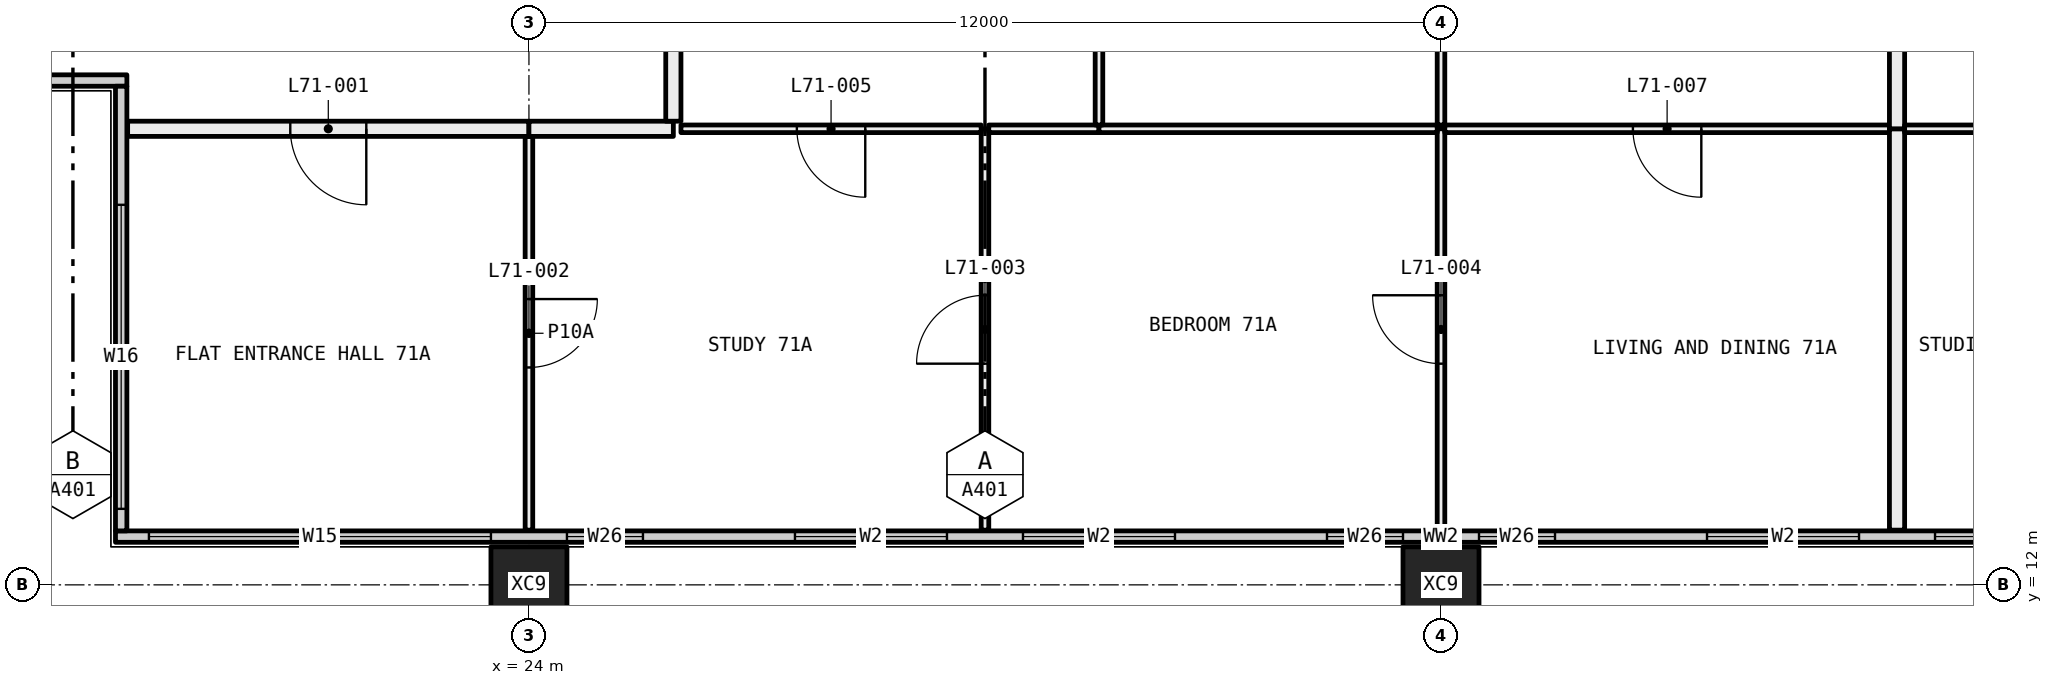
"""IFC4 building model, lengths in metres.
Left out: names, types, materials, properties, quantities, classifications, styles, units other than length and angle.
Written with IfcOpenShell. Run it as: python <this file> out.ifc"""

import sys

from ifc_helpers import new_model, si_unit, direction, frame, frame_2d, origin, origin_2d, place, context, subcontext, project, spatial, rectangle, hollow_rectangle, extrude, element, fill, save


model = new_model("IFC4")
c1 = context("Model", 3, precision=1e-05, world=origin(), true_north=direction((0.0, 1.0)))
c2 = subcontext(c1, "Body", "Model", "MODEL_VIEW")
j1 = project(units=[si_unit("LENGTHUNIT", "METRE"), si_unit("PLANEANGLEUNIT", "RADIAN")], contexts=[c1])
p1 = place(None, origin())
s1 = spatial("IfcSite", under=j1, at=p1, CompositionType="ELEMENT")
p2 = place(p1, origin())
s2 = spatial("IfcBuilding", under=s1, at=p2, CompositionType="ELEMENT")
p3 = place(p2, frame((0.0, 0.0, 262.8)))
s3 = spatial("IfcBuildingStorey", under=s2, at=p3, CompositionType="ELEMENT", Elevation=262.8)
for number, where, z_axis, x_axis in (
    (1, (24.0, 12.0, -0.4), (0.0, 0.0, 1.0), (1.0, 0.0, 0.0)),
    (2, (36.0, 12.0, -0.4), (0.0, 0.0, 1.0), (1.0, 0.0, 0.0)),
):
    element("IfcColumn", number, at=place(p3, frame(where, z_axis=z_axis, x_axis=x_axis)), inside=s3, PredefinedType="COLUMN", context=c2, shape_type="SweptSolid", body=[
        extrude(hollow_rectangle(XDim=1.0, YDim=1.0, WallThickness=0.036, at=origin_2d()), origin(), (0.0, 0.0, 1.0), 3.45),
    ])
p4 = place(p3, frame((18.56, 12.635, 0.0), z_axis=(0.0, 0.0, 1.0), x_axis=(1.0, 0.0, 0.0)))
e3 = element("IfcWall", 3, at=p4, inside=s3, PredefinedType="ELEMENTEDWALL", context=c2, shape_type="SweptSolid", body=[
    extrude(rectangle(XDim=34.88, YDim=0.15, at=frame_2d((17.44, 0.0))), origin(), (0.0, 0.0, 1.0), 3.05),
])
p5 = place(p4, frame((0.44, 0.0, 0.45)))
e4 = element("IfcOpeningElement", 4, at=p5, cuts=e3, PredefinedType="OPENING", context=c2, shape_type="SweptSolid", body=[
    extrude(rectangle(XDim=4.5, YDim=2.55, at=frame_2d((2.25, 1.275))), frame((0.0, 0.085, 0.0), z_axis=(0.0, -1.0, 0.0), x_axis=(1.0, 0.0, 0.0)), (0.0, 0.0, 1.0), 0.17),
])
p6 = place(p4, frame((5.94, 0.0, 0.45)))
e5 = element("IfcOpeningElement", 5, at=p6, cuts=e3, PredefinedType="OPENING", context=c2, shape_type="SweptSolid", body=[
    extrude(rectangle(XDim=1.0, YDim=2.55, at=frame_2d((0.5, 1.275))), frame((0.0, 0.085, 0.0), z_axis=(0.0, -1.0, 0.0), x_axis=(1.0, 0.0, 0.0)), (0.0, 0.0, 1.0), 0.17),
])
p7 = place(p4, frame((8.94, 0.0, 0.45)))
e6 = element("IfcOpeningElement", 6, at=p7, cuts=e3, PredefinedType="OPENING", context=c2, shape_type="SweptSolid", body=[
    extrude(rectangle(XDim=2.0, YDim=2.55, at=frame_2d((1.0, 1.275))), frame((0.0, 0.085, 0.0), z_axis=(0.0, -1.0, 0.0), x_axis=(1.0, 0.0, 0.0)), (0.0, 0.0, 1.0), 0.17),
])
p8 = place(p4, frame((11.94, 0.0, 0.45)))
e7 = element("IfcOpeningElement", 7, at=p8, cuts=e3, PredefinedType="OPENING", context=c2, shape_type="SweptSolid", body=[
    extrude(rectangle(XDim=2.0, YDim=2.55, at=frame_2d((1.0, 1.275))), frame((0.0, 0.085, 0.0), z_axis=(0.0, -1.0, 0.0), x_axis=(1.0, 0.0, 0.0)), (0.0, 0.0, 1.0), 0.17),
])
p9 = place(p4, frame((15.94, 0.0, 0.45)))
e8 = element("IfcOpeningElement", 8, at=p9, cuts=e3, PredefinedType="OPENING", context=c2, shape_type="SweptSolid", body=[
    extrude(rectangle(XDim=1.0, YDim=2.55, at=frame_2d((0.5, 1.275))), frame((0.0, 0.085, 0.0), z_axis=(0.0, -1.0, 0.0), x_axis=(1.0, 0.0, 0.0)), (0.0, 0.0, 1.0), 0.17),
])
p10 = place(p4, frame((17.94, 0.0, 0.45)))
e9 = element("IfcOpeningElement", 9, at=p10, cuts=e3, PredefinedType="OPENING", context=c2, shape_type="SweptSolid", body=[
    extrude(rectangle(XDim=1.0, YDim=2.55, at=frame_2d((0.5, 1.275))), frame((0.0, 0.085, 0.0), z_axis=(0.0, -1.0, 0.0), x_axis=(1.0, 0.0, 0.0)), (0.0, 0.0, 1.0), 0.17),
])
p11 = place(p4, frame((20.94, 0.0, 0.45)))
e10 = element("IfcOpeningElement", 10, at=p11, cuts=e3, PredefinedType="OPENING", context=c2, shape_type="SweptSolid", body=[
    extrude(rectangle(XDim=2.0, YDim=2.55, at=frame_2d((1.0, 1.275))), frame((0.0, 0.085, 0.0), z_axis=(0.0, -1.0, 0.0), x_axis=(1.0, 0.0, 0.0)), (0.0, 0.0, 1.0), 0.17),
])
p12 = place(p4, frame((23.94, 0.0, 0.45)))
e11 = element("IfcOpeningElement", 11, at=p12, cuts=e3, PredefinedType="OPENING", context=c2, shape_type="SweptSolid", body=[
    extrude(rectangle(XDim=2.0, YDim=2.55, at=frame_2d((1.0, 1.275))), frame((0.0, 0.085, 0.0), z_axis=(0.0, -1.0, 0.0), x_axis=(1.0, 0.0, 0.0)), (0.0, 0.0, 1.0), 0.17),
])
p13 = place(p4, frame((27.94, 0.0, 0.45)))
e12 = element("IfcOpeningElement", 12, at=p13, cuts=e3, PredefinedType="OPENING", context=c2, shape_type="SweptSolid", body=[
    extrude(rectangle(XDim=1.0, YDim=2.55, at=frame_2d((0.5, 1.275))), frame((0.0, 0.085, 0.0), z_axis=(0.0, -1.0, 0.0), x_axis=(1.0, 0.0, 0.0)), (0.0, 0.0, 1.0), 0.17),
])
p14 = place(p4, frame((29.94, 0.0, 0.45)))
e13 = element("IfcOpeningElement", 13, at=p14, cuts=e3, PredefinedType="OPENING", context=c2, shape_type="SweptSolid", body=[
    extrude(rectangle(XDim=4.5, YDim=2.55, at=frame_2d((2.25, 1.275))), frame((0.0, 0.085, 0.0), z_axis=(0.0, -1.0, 0.0), x_axis=(1.0, 0.0, 0.0)), (0.0, 0.0, 1.0), 0.17),
])
p15 = place(p3, frame((12.56, 18.635, 0.0), z_axis=(0.0, 0.0, 1.0), x_axis=(1.0, 0.0, 0.0)))
e14 = element("IfcWall", 14, at=p15, inside=s3, PredefinedType="ELEMENTEDWALL", context=c2, shape_type="SweptSolid", body=[
    extrude(rectangle(XDim=6.15, YDim=0.15, at=frame_2d((3.075, 0.0))), origin(), (0.0, 0.0, 1.0), 3.05),
])
p16 = place(p15, frame((0.44, 0.0, 0.45)))
e15 = element("IfcOpeningElement", 15, at=p16, cuts=e14, PredefinedType="OPENING", context=c2, shape_type="SweptSolid", body=[
    extrude(rectangle(XDim=4.0, YDim=2.55, at=frame_2d((2.0, 1.275))), frame((0.0, 0.085, 0.0), z_axis=(0.0, -1.0, 0.0), x_axis=(1.0, 0.0, 0.0)), (0.0, 0.0, 1.0), 0.17),
])
p17 = place(p3, frame((18.635, 12.71, 0.0), z_axis=(0.0, 0.0, 1.0), x_axis=(0.0, 1.0, 0.0)))
e16 = element("IfcWall", 16, at=p17, inside=s3, PredefinedType="ELEMENTEDWALL", context=c2, shape_type="SweptSolid", body=[
    extrude(rectangle(XDim=5.85, YDim=0.15, at=frame_2d((2.925, 0.0))), origin(), (0.0, 0.0, 1.0), 3.05),
])
p18 = place(p17, frame((0.29, 0.0, 0.45)))
e17 = element("IfcOpeningElement", 17, at=p18, cuts=e16, PredefinedType="OPENING", context=c2, shape_type="SweptSolid", body=[
    extrude(rectangle(XDim=4.0, YDim=2.55, at=frame_2d((2.0, 1.275))), frame((0.0, 0.085, 0.0), z_axis=(0.0, -1.0, 0.0), x_axis=(1.0, 0.0, 0.0)), (0.0, 0.0, 1.0), 0.17),
])
p19 = place(p3, frame((24.0, 12.72, 0.0), z_axis=(0.0, 0.0, 1.0), x_axis=(0.0, 1.0, 0.0)))
e18 = element("IfcWall", 18, at=p19, inside=s3, PredefinedType="PARTITIONING", context=c2, shape_type="SweptSolid", body=[
    extrude(rectangle(XDim=5.18, YDim=0.1, at=frame_2d((2.59, 0.0))), origin(), (0.0, 0.0, 1.0), 3.05),
])
p20 = place(p19, frame((2.14, 0.0, 0.0)))
e19 = element("IfcOpeningElement", 19, at=p20, cuts=e18, PredefinedType="OPENING", context=c2, shape_type="SweptSolid", body=[
    extrude(rectangle(XDim=0.9, YDim=2.1, at=frame_2d((0.45, 1.05))), frame((0.0, 0.06, 0.0), z_axis=(0.0, -1.0, 0.0), x_axis=(1.0, 0.0, 0.0)), (0.0, 0.0, 1.0), 0.12),
])
p21 = place(p3, frame((24.0, 18.0, 0.0), z_axis=(0.0, 0.0, 1.0), x_axis=(-1.0, 0.0, 0.0)))
e20 = element("IfcWall", 20, at=p21, inside=s3, PredefinedType="PARTITIONING", context=c2, shape_type="SweptSolid", body=[
    extrude(rectangle(XDim=5.28, YDim=0.2, at=frame_2d((2.64, 0.0))), origin(), (0.0, 0.0, 1.0), 3.05),
])
p22 = place(p21, frame((2.14, 0.0, 0.0)))
e21 = element("IfcOpeningElement", 21, at=p22, cuts=e20, PredefinedType="OPENING", context=c2, shape_type="SweptSolid", body=[
    extrude(rectangle(XDim=1.0, YDim=2.1, at=frame_2d((0.5, 1.05))), frame((0.0, 0.11, 0.0), z_axis=(0.0, -1.0, 0.0), x_axis=(1.0, 0.0, 0.0)), (0.0, 0.0, 1.0), 0.22),
])
p23 = place(p3, frame((30.0, 12.72, 0.0), z_axis=(0.0, 0.0, 1.0), x_axis=(0.0, 1.0, 0.0)))
e22 = element("IfcWall", 22, at=p23, inside=s3, PredefinedType="PARTITIONING", context=c2, shape_type="SweptSolid", body=[
    extrude(rectangle(XDim=5.28, YDim=0.1, at=frame_2d((2.64, 0.0))), origin(), (0.0, 0.0, 1.0), 3.05),
])
p24 = place(p23, frame((2.19, 0.0, 0.0)))
e23 = element("IfcOpeningElement", 23, at=p24, cuts=e22, PredefinedType="OPENING", context=c2, shape_type="SweptSolid", body=[
    extrude(rectangle(XDim=0.9, YDim=2.1, at=frame_2d((0.45, 1.05))), frame((0.0, 0.06, 0.0), z_axis=(0.0, -1.0, 0.0), x_axis=(1.0, 0.0, 0.0)), (0.0, 0.0, 1.0), 0.12),
])
p25 = place(p3, frame((29.95, 18.0, 0.0), z_axis=(0.0, 0.0, 1.0), x_axis=(-1.0, 0.0, 0.0)))
e24 = element("IfcWall", 24, at=p25, inside=s3, PredefinedType="PARTITIONING", context=c2, shape_type="SweptSolid", body=[
    extrude(rectangle(XDim=3.95, YDim=0.1, at=frame_2d((1.975, 0.0))), origin(), (0.0, 0.0, 1.0), 3.05),
])
p26 = place(p25, frame((1.525, 0.0, 0.0)))
e25 = element("IfcOpeningElement", 25, at=p26, cuts=e24, PredefinedType="OPENING", context=c2, shape_type="SweptSolid", body=[
    extrude(rectangle(XDim=0.9, YDim=2.1, at=frame_2d((0.45, 1.05))), frame((0.0, 0.06, 0.0), z_axis=(0.0, -1.0, 0.0), x_axis=(1.0, 0.0, 0.0)), (0.0, 0.0, 1.0), 0.12),
])
p27 = place(p3, frame((25.9, 18.0, 0.0), z_axis=(0.0, 0.0, 1.0), x_axis=(-1.0, 0.0, 0.0)))
e26 = element("IfcWall", 26, at=p27, inside=s3, PredefinedType="PARTITIONING", context=c2, shape_type="SweptSolid", body=[
    extrude(rectangle(XDim=1.9, YDim=0.2, at=frame_2d((0.95, 0.0))), origin(), (0.0, 0.0, 1.0), 3.05),
])
p28 = place(p3, frame((36.0, 12.72, 0.0), z_axis=(0.0, 0.0, 1.0), x_axis=(0.0, 1.0, 0.0)))
e27 = element("IfcWall", 27, at=p28, inside=s3, PredefinedType="PARTITIONING", context=c2, shape_type="SweptSolid", body=[
    extrude(rectangle(XDim=5.28, YDim=0.1, at=frame_2d((2.64, 0.0))), origin(), (0.0, 0.0, 1.0), 2.45),
])
p29 = place(p28, frame((2.19, 0.0, 0.0)))
e28 = element("IfcOpeningElement", 28, at=p29, cuts=e27, PredefinedType="OPENING", context=c2, shape_type="SweptSolid", body=[
    extrude(rectangle(XDim=0.9, YDim=2.1, at=frame_2d((0.45, 1.05))), frame((0.0, 0.06, 0.0), z_axis=(0.0, -1.0, 0.0), x_axis=(1.0, 0.0, 0.0)), (0.0, 0.0, 1.0), 0.12),
])
p30 = place(p3, frame((31.5, 18.0, 0.0), z_axis=(0.0, 0.0, 1.0), x_axis=(-1.0, 0.0, 0.0)))
e29 = element("IfcWall", 29, at=p30, inside=s3, PredefinedType="PARTITIONING", context=c2, shape_type="SweptSolid", body=[
    extrude(rectangle(XDim=1.45, YDim=0.1, at=frame_2d((0.725, 0.0))), origin(), (0.0, 0.0, 1.0), 3.05),
])
p31 = place(p3, frame((35.95, 18.0, 0.0), z_axis=(0.0, 0.0, 1.0), x_axis=(-1.0, 0.0, 0.0)))
e30 = element("IfcWall", 30, at=p31, inside=s3, PredefinedType="PARTITIONING", context=c2, shape_type="SweptSolid", body=[
    extrude(rectangle(XDim=4.45, YDim=0.1, at=frame_2d((2.225, 0.0))), origin(), (0.0, 0.0, 1.0), 2.45),
])
p32 = place(p3, frame((41.9, 18.0, 0.0), z_axis=(0.0, 0.0, 1.0), x_axis=(-1.0, 0.0, 0.0)))
e31 = element("IfcWall", 31, at=p32, inside=s3, PredefinedType="PARTITIONING", context=c2, shape_type="SweptSolid", body=[
    extrude(rectangle(XDim=5.85, YDim=0.1, at=frame_2d((2.925, 0.0))), origin(), (0.0, 0.0, 1.0), 2.45),
])
p33 = place(p32, frame((2.475, 0.0, 0.0)))
e32 = element("IfcOpeningElement", 32, at=p33, cuts=e31, PredefinedType="OPENING", context=c2, shape_type="SweptSolid", body=[
    extrude(rectangle(XDim=0.9, YDim=2.1, at=frame_2d((0.45, 1.05))), frame((0.0, 0.06, 0.0), z_axis=(0.0, -1.0, 0.0), x_axis=(1.0, 0.0, 0.0)), (0.0, 0.0, 1.0), 0.12),
])
p34 = place(p3, frame((42.0, 12.72, 0.0), z_axis=(0.0, 0.0, 1.0), x_axis=(0.0, 1.0, 0.0)))
e33 = element("IfcWall", 33, at=p34, inside=s3, PredefinedType="PARTITIONING", context=c2, shape_type="SweptSolid", body=[
    extrude(rectangle(XDim=5.28, YDim=0.2, at=frame_2d((2.64, 0.0))), origin(), (0.0, 0.0, 1.0), 3.05),
])
p35 = place(p3, frame((31.5, 18.05, 0.0), z_axis=(0.0, 0.0, 1.0), x_axis=(0.0, 1.0, 0.0)))
e34 = element("IfcWall", 34, at=p35, inside=s3, PredefinedType="PARTITIONING", context=c2, shape_type="SweptSolid", body=[
    extrude(rectangle(XDim=6.25, YDim=0.1, at=frame_2d((3.125, 0.0))), origin(), (0.0, 0.0, 1.0), 2.45),
])
p36 = place(p35, frame((2.675, 0.0, 0.0)))
e35 = element("IfcOpeningElement", 35, at=p36, cuts=e34, PredefinedType="OPENING", context=c2, shape_type="SweptSolid", body=[
    extrude(rectangle(XDim=0.9, YDim=2.1, at=frame_2d((0.45, 1.05))), frame((0.0, 0.06, 0.0), z_axis=(0.0, -1.0, 0.0), x_axis=(1.0, 0.0, 0.0)), (0.0, 0.0, 1.0), 0.12),
])
p37 = place(p3, frame((25.9, 23.9, 0.0), z_axis=(0.0, 0.0, 1.0), x_axis=(0.0, -1.0, 0.0)))
e36 = element("IfcWall", 36, at=p37, inside=s3, PredefinedType="PARTITIONING", context=c2, shape_type="SweptSolid", body=[
    extrude(rectangle(XDim=5.8, YDim=0.2, at=frame_2d((2.9, 0.0))), origin(), (0.0, 0.0, 1.0), 3.05),
])
p38 = place(p3, frame((36.0, 18.05, 0.0), z_axis=(0.0, 0.0, 1.0), x_axis=(0.0, 1.0, 0.0)))
e37 = element("IfcWall", 37, at=p38, inside=s3, PredefinedType="PARTITIONING", context=c2, shape_type="SweptSolid", body=[
    extrude(rectangle(XDim=5.4, YDim=0.1, at=frame_2d((2.7, 0.0))), origin(), (0.0, 0.0, 1.0), 2.45),
])
p39 = place(p3, frame((42.0, 18.0, 0.0), z_axis=(0.0, 0.0, 1.0), x_axis=(0.0, 1.0, 0.0)))
e38 = element("IfcWall", 38, at=p39, inside=s3, PredefinedType="PARTITIONING", context=c2, shape_type="SweptSolid", body=[
    extrude(rectangle(XDim=6.3, YDim=0.2, at=frame_2d((3.15, 0.0))), origin(), (0.0, 0.0, 1.0), 2.45),
])
p40 = place(p3, frame((46.0, 18.0, 0.0), z_axis=(0.0, 0.0, 1.0), x_axis=(-1.0, 0.0, 0.0)))
e39 = element("IfcWall", 39, at=p40, inside=s3, PredefinedType="PARTITIONING", context=c2, shape_type="SweptSolid", body=[
    extrude(rectangle(XDim=3.9, YDim=0.1, at=frame_2d((1.95, 0.0))), origin(), (0.0, 0.0, 1.0), 3.05),
])
p41 = place(p40, frame((1.5, 0.0, 0.0)))
e40 = element("IfcOpeningElement", 40, at=p41, cuts=e39, PredefinedType="OPENING", context=c2, shape_type="SweptSolid", body=[
    extrude(rectangle(XDim=0.9, YDim=2.1, at=frame_2d((0.45, 1.05))), frame((0.0, 0.06, 0.0), z_axis=(0.0, -1.0, 0.0), x_axis=(1.0, 0.0, 0.0)), (0.0, 0.0, 1.0), 0.12),
])
p42 = place(p5, origin())
e41 = element("IfcWindow", 41, at=p42, inside=s3, PartitioningType="SINGLE_PANEL", PredefinedType="WINDOW", context=c2, shape_type="SweptSolid", body=[
    extrude(rectangle(XDim=4.5, YDim=2.55, at=frame_2d((2.25, 1.275))), frame((0.0, 0.03, 0.0), z_axis=(0.0, -1.0, 0.0), x_axis=(1.0, 0.0, 0.0)), (0.0, 0.0, 1.0), 0.06),
])
fill(e4, e41)
p43 = place(p6, origin())
e42 = element("IfcWindow", 42, at=p43, inside=s3, PartitioningType="SINGLE_PANEL", PredefinedType="WINDOW", context=c2, shape_type="SweptSolid", body=[
    extrude(rectangle(XDim=1.0, YDim=2.55, at=frame_2d((0.5, 1.275))), frame((0.0, 0.03, 0.0), z_axis=(0.0, -1.0, 0.0), x_axis=(1.0, 0.0, 0.0)), (0.0, 0.0, 1.0), 0.06),
])
fill(e5, e42)
p44 = place(p7, origin())
e43 = element("IfcWindow", 43, at=p44, inside=s3, PartitioningType="SINGLE_PANEL", PredefinedType="WINDOW", context=c2, shape_type="SweptSolid", body=[
    extrude(rectangle(XDim=2.0, YDim=2.55, at=frame_2d((1.0, 1.275))), frame((0.0, 0.03, 0.0), z_axis=(0.0, -1.0, 0.0), x_axis=(1.0, 0.0, 0.0)), (0.0, 0.0, 1.0), 0.06),
])
fill(e6, e43)
p45 = place(p8, origin())
e44 = element("IfcWindow", 44, at=p45, inside=s3, PartitioningType="SINGLE_PANEL", PredefinedType="WINDOW", context=c2, shape_type="SweptSolid", body=[
    extrude(rectangle(XDim=2.0, YDim=2.55, at=frame_2d((1.0, 1.275))), frame((0.0, 0.03, 0.0), z_axis=(0.0, -1.0, 0.0), x_axis=(1.0, 0.0, 0.0)), (0.0, 0.0, 1.0), 0.06),
])
fill(e7, e44)
p46 = place(p9, origin())
e45 = element("IfcWindow", 45, at=p46, inside=s3, PartitioningType="SINGLE_PANEL", PredefinedType="WINDOW", context=c2, shape_type="SweptSolid", body=[
    extrude(rectangle(XDim=1.0, YDim=2.55, at=frame_2d((0.5, 1.275))), frame((0.0, 0.03, 0.0), z_axis=(0.0, -1.0, 0.0), x_axis=(1.0, 0.0, 0.0)), (0.0, 0.0, 1.0), 0.06),
])
fill(e8, e45)
p47 = place(p10, origin())
e46 = element("IfcWindow", 46, at=p47, inside=s3, PartitioningType="SINGLE_PANEL", PredefinedType="WINDOW", context=c2, shape_type="SweptSolid", body=[
    extrude(rectangle(XDim=1.0, YDim=2.55, at=frame_2d((0.5, 1.275))), frame((0.0, 0.03, 0.0), z_axis=(0.0, -1.0, 0.0), x_axis=(1.0, 0.0, 0.0)), (0.0, 0.0, 1.0), 0.06),
])
fill(e9, e46)
p48 = place(p11, origin())
e47 = element("IfcWindow", 47, at=p48, inside=s3, PartitioningType="SINGLE_PANEL", PredefinedType="WINDOW", context=c2, shape_type="SweptSolid", body=[
    extrude(rectangle(XDim=2.0, YDim=2.55, at=frame_2d((1.0, 1.275))), frame((0.0, 0.03, 0.0), z_axis=(0.0, -1.0, 0.0), x_axis=(1.0, 0.0, 0.0)), (0.0, 0.0, 1.0), 0.06),
])
fill(e10, e47)
p49 = place(p12, origin())
e48 = element("IfcWindow", 48, at=p49, inside=s3, PartitioningType="SINGLE_PANEL", PredefinedType="WINDOW", context=c2, shape_type="SweptSolid", body=[
    extrude(rectangle(XDim=2.0, YDim=2.55, at=frame_2d((1.0, 1.275))), frame((0.0, 0.03, 0.0), z_axis=(0.0, -1.0, 0.0), x_axis=(1.0, 0.0, 0.0)), (0.0, 0.0, 1.0), 0.06),
])
fill(e11, e48)
p50 = place(p18, origin())
e49 = element("IfcWindow", 49, at=p50, inside=s3, PartitioningType="SINGLE_PANEL", PredefinedType="WINDOW", context=c2, shape_type="SweptSolid", body=[
    extrude(rectangle(XDim=4.0, YDim=2.55, at=frame_2d((2.0, 1.275))), frame((0.0, 0.03, 0.0), z_axis=(0.0, -1.0, 0.0), x_axis=(1.0, 0.0, 0.0)), (0.0, 0.0, 1.0), 0.06),
])
fill(e17, e49)
p51 = place(p22, origin())
e50 = element("IfcDoor", 50, at=p51, inside=s3, OperationType="SINGLE_SWING_RIGHT", PredefinedType="DOOR", context=c2, shape_type="SweptSolid", body=[
    extrude(rectangle(XDim=1.0, YDim=2.1, at=frame_2d((0.5, 1.05))), frame((0.0, 0.025, 0.0), z_axis=(0.0, -1.0, 0.0), x_axis=(1.0, 0.0, 0.0)), (0.0, 0.0, 1.0), 0.05),
])
fill(e21, e50)
p52 = place(p20, frame((0.9, 0.0, 0.0), x_axis=(-1.0, 0.0, 0.0)))
e51 = element("IfcDoor", 51, at=p52, inside=s3, OperationType="SINGLE_SWING_RIGHT", PredefinedType="DOOR", context=c2, shape_type="SweptSolid", body=[
    extrude(rectangle(XDim=0.9, YDim=2.1, at=frame_2d((0.45, 1.05))), frame((0.0, 0.025, 0.0), z_axis=(0.0, -1.0, 0.0), x_axis=(1.0, 0.0, 0.0)), (0.0, 0.0, 1.0), 0.05),
])
fill(e19, e51)
p53 = place(p24, origin())
e52 = element("IfcDoor", 52, at=p53, inside=s3, OperationType="SINGLE_SWING_RIGHT", PredefinedType="DOOR", context=c2, shape_type="SweptSolid", body=[
    extrude(rectangle(XDim=0.9, YDim=2.1, at=frame_2d((0.45, 1.05))), frame((0.0, 0.025, 0.0), z_axis=(0.0, -1.0, 0.0), x_axis=(1.0, 0.0, 0.0)), (0.0, 0.0, 1.0), 0.05),
])
fill(e23, e52)
p54 = place(p29, origin())
e53 = element("IfcDoor", 53, at=p54, inside=s3, OperationType="SINGLE_SWING_LEFT", PredefinedType="DOOR", context=c2, shape_type="SweptSolid", body=[
    extrude(rectangle(XDim=0.9, YDim=2.1, at=frame_2d((0.45, 1.05))), frame((0.0, 0.025, 0.0), z_axis=(0.0, -1.0, 0.0), x_axis=(1.0, 0.0, 0.0)), (0.0, 0.0, 1.0), 0.05),
])
fill(e28, e53)
p55 = place(p26, origin())
e54 = element("IfcDoor", 54, at=p55, inside=s3, OperationType="SINGLE_SWING_RIGHT", PredefinedType="DOOR", context=c2, shape_type="SweptSolid", body=[
    extrude(rectangle(XDim=0.9, YDim=2.1, at=frame_2d((0.45, 1.05))), frame((0.0, 0.025, 0.0), z_axis=(0.0, -1.0, 0.0), x_axis=(1.0, 0.0, 0.0)), (0.0, 0.0, 1.0), 0.05),
])
fill(e25, e54)
p56 = place(p33, origin())
e55 = element("IfcDoor", 55, at=p56, inside=s3, OperationType="SINGLE_SWING_RIGHT", PredefinedType="DOOR", context=c2, shape_type="SweptSolid", body=[
    extrude(rectangle(XDim=0.9, YDim=2.1, at=frame_2d((0.45, 1.05))), frame((0.0, 0.025, 0.0), z_axis=(0.0, -1.0, 0.0), x_axis=(1.0, 0.0, 0.0)), (0.0, 0.0, 1.0), 0.05),
])
fill(e32, e55)
save(model, sys.argv[1])
